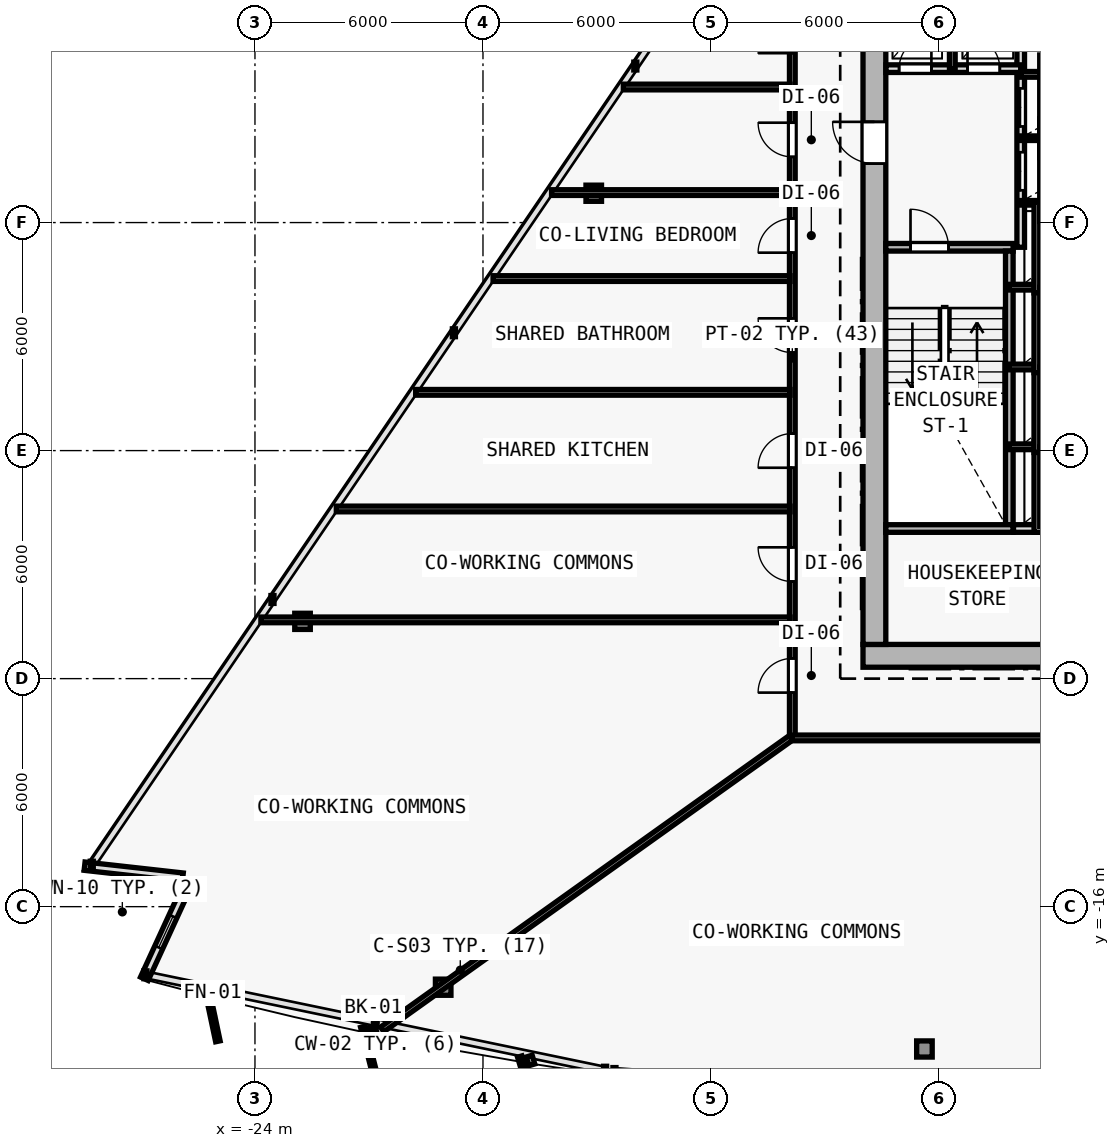
"""IFC4 building model, lengths in metres.
Left out: names, types, materials, properties, quantities, classifications, styles, units other than length and angle.
Written with IfcOpenShell. Run it as: python <this file> out.ifc"""

import sys

from ifc_helpers import new_model, si_unit, direction, frame, frame_2d, origin, origin_2d, place, context, subcontext, project, spatial, rectangle, i_section, extrude, element, fill, save


model = new_model("IFC4")
c1 = context("Model", 3, precision=1e-05, world=origin(), true_north=direction((0.0, 1.0)))
c2 = subcontext(c1, "Body", "Model", "MODEL_VIEW")
j1 = project(units=[si_unit("LENGTHUNIT", "METRE"), si_unit("PLANEANGLEUNIT", "RADIAN")], contexts=[c1])
p1 = place(None, origin())
s1 = spatial("IfcSite", under=j1, at=p1, CompositionType="ELEMENT")
p2 = place(p1, origin())
s2 = spatial("IfcBuilding", under=s1, at=p2, CompositionType="ELEMENT")
p3 = place(p2, frame((0.0, 0.0, 93.3)))
s3 = spatial("IfcBuildingStorey", under=s2, at=p3, CompositionType="ELEMENT", Elevation=93.3)
for number, where, z_axis, x_axis in (
    (1, (-7.7, -9.4, 0.0), (0.0, 0.0, 1.0), (1.0, 0.0, 0.0)),
    (2, (-7.7, 2.0, 0.0), (0.0, 0.0, 1.0), (1.0, 0.0, 0.0)),
):
    element("IfcColumn", number, at=place(p3, frame(where, z_axis=z_axis, x_axis=x_axis)), inside=s3, PredefinedType="COLUMN", context=c2, shape_type="SweptSolid", body=[
        extrude(i_section(OverallWidth=0.409, OverallDepth=0.425, WebThickness=0.021, FlangeThickness=0.034, FilletRadius=0.015, at=origin_2d()), origin(), (0.0, 0.0, 1.0), 3.6),
    ])
p4 = place(p3, frame((-19.047, -18.119, 0.005), z_axis=(0.020594847032, 0.03357707734, 0.999223914922), x_axis=(-0.852427604955, 0.522845271865, 0.0)))
e3 = element("IfcColumn", 3, at=p4, inside=s3, PredefinedType="COLUMN", context=c2, shape_type="SweptSolid", body=[
    extrude(i_section(OverallWidth=0.409, OverallDepth=0.425, WebThickness=0.021, FlangeThickness=0.034, FilletRadius=0.015, at=origin_2d()), origin(), (0.0, 0.0, 1.0), 3.592),
])
p5 = place(p3, frame((-6.384, -19.745, 0.005), z_axis=(0.00693381708, 0.03528089279, 0.999353381334), x_axis=(-0.981229659911, 0.192842823335, 0.0)))
e4 = element("IfcColumn", 4, at=p5, inside=s3, PredefinedType="COLUMN", context=c2, shape_type="SweptSolid", body=[
    extrude(i_section(OverallWidth=0.409, OverallDepth=0.425, WebThickness=0.021, FlangeThickness=0.034, FilletRadius=0.015, at=origin_2d()), origin(), (0.0, 0.0, 1.0), 3.592),
])
p6 = place(p3, frame((-15.085, 2.772, 0.005), z_axis=(0.01700241672, 0.009521353363, 0.999810112799), x_axis=(-0.488603368932, 0.87250601595, 0.0)))
e5 = element("IfcColumn", 5, at=p6, inside=s3, PredefinedType="COLUMN", context=c2, shape_type="SweptSolid", body=[
    extrude(i_section(OverallWidth=0.409, OverallDepth=0.425, WebThickness=0.021, FlangeThickness=0.034, FilletRadius=0.015, at=origin_2d()), origin(), (0.0, 0.0, 1.0), 3.59),
])
p7 = place(p3, frame((-22.749, -8.493, 0.005), z_axis=(0.025222449659, 0.021619242565, 0.999448065876), x_axis=(-0.650791373456, 0.759256602365, 0.0)))
e6 = element("IfcColumn", 6, at=p7, inside=s3, PredefinedType="COLUMN", context=c2, shape_type="SweptSolid", body=[
    extrude(i_section(OverallWidth=0.409, OverallDepth=0.425, WebThickness=0.021, FlangeThickness=0.034, FilletRadius=0.015, at=origin_2d()), origin(), (0.0, 0.0, 1.0), 3.591),
])
p8 = place(p3, frame((-25.898, -15.223, 0.0), z_axis=(0.0, 0.0, 1.0), x_axis=(-0.993827522589, 0.110936267041, 0.0)))
e7 = element("IfcWall", 7, at=p8, inside=s3, PredefinedType="SOLIDWALL", context=c2, shape_type="SweptSolid", body=[
    extrude(rectangle(XDim=2.601, YDim=0.22, at=frame_2d((1.301, 0.0))), origin(), (0.0, 0.0, 1.0), 3.35),
])
p9 = place(p3, frame((-26.911, -17.897, 0.0), z_axis=(0.0, 0.0, 1.0), x_axis=(0.417504190978, 0.908674997189, 0.0)))
e8 = element("IfcWall", 8, at=p9, inside=s3, PredefinedType="SOLIDWALL", context=c2, shape_type="SweptSolid", body=[
    extrude(rectangle(XDim=2.711, YDim=0.22, at=frame_2d((1.355, 0.0))), origin(), (0.0, 0.0, 1.0), 3.35),
])
p10 = place(p9, frame((0.906, 0.0, 0.62)))
e9 = element("IfcOpeningElement", 9, at=p10, cuts=e8, PredefinedType="OPENING", context=c2, shape_type="SweptSolid", body=[
    extrude(rectangle(XDim=0.9, YDim=1.6, at=frame_2d((0.45, 0.8))), frame((0.0, 0.12, 0.0), z_axis=(0.0, -1.0, 0.0), x_axis=(1.0, 0.0, 0.0)), (0.0, 0.0, 1.0), 0.24),
])
p11 = place(p3, frame((-8.0, -9.4, 0.0), z_axis=(0.0, 0.0, 1.0), x_axis=(1.0, 0.0, 0.0)))
e10 = element("IfcWall", 10, at=p11, inside=s3, PredefinedType="SHEAR", context=c2, shape_type="SweptSolid", body=[
    extrude(rectangle(XDim=16.0, YDim=0.6, at=frame_2d((8.0, 0.0))), origin(), (0.0, 0.0, 1.0), 3.35),
])
p12 = place(p11, frame((9.65, 0.0, 0.0)))
e11 = element("IfcOpeningElement", 11, at=p12, cuts=e10, PredefinedType="OPENING", context=c2, shape_type="SweptSolid", body=[
    extrude(rectangle(XDim=1.5, YDim=2.2, at=frame_2d((0.75, 1.1))), frame((0.0, 0.31, 0.0), z_axis=(0.0, -1.0, 0.0), x_axis=(1.0, 0.0, 0.0)), (0.0, 0.0, 1.0), 0.62),
])
p13 = place(p3, frame((-7.7, -9.1, 0.0), z_axis=(0.0, 0.0, 1.0), x_axis=(0.0, 1.0, 0.0)))
e12 = element("IfcWall", 12, at=p13, inside=s3, PredefinedType="SHEAR", context=c2, shape_type="SweptSolid", body=[
    extrude(rectangle(XDim=19.0, YDim=0.6, at=frame_2d((9.5, 0.0))), origin(), (0.0, 0.0, 1.0), 3.35),
])
p14 = place(p13, frame((12.65, 0.0, 0.0)))
e13 = element("IfcOpeningElement", 13, at=p14, cuts=e12, PredefinedType="OPENING", context=c2, shape_type="SweptSolid", body=[
    extrude(rectangle(XDim=1.1, YDim=2.15, at=frame_2d((0.55, 1.075))), frame((0.0, 0.31, 0.0), z_axis=(0.0, -1.0, 0.0), x_axis=(1.0, 0.0, 0.0)), (0.0, 0.0, 1.0), 0.62),
])
p15 = place(p3, frame((-7.4, 1.35, 0.0), z_axis=(0.0, 0.0, 1.0), x_axis=(1.0, 0.0, 0.0)))
e14 = element("IfcWall", 14, at=p15, inside=s3, PredefinedType="SOLIDWALL", context=c2, shape_type="SweptSolid", body=[
    extrude(rectangle(XDim=3.35, YDim=0.2, at=frame_2d((1.675, 0.0))), origin(), (0.0, 0.0, 1.0), 3.35),
])
p16 = place(p15, frame((0.65, 0.0, 0.0)))
e15 = element("IfcOpeningElement", 15, at=p16, cuts=e14, PredefinedType="OPENING", context=c2, shape_type="SweptSolid", body=[
    extrude(rectangle(XDim=1.0, YDim=2.15, at=frame_2d((0.5, 1.075))), frame((0.0, 0.11, 0.0), z_axis=(0.0, -1.0, 0.0), x_axis=(1.0, 0.0, 0.0)), (0.0, 0.0, 1.0), 0.22),
])
p17 = place(p3, frame((-4.15, -5.95, 0.0), z_axis=(0.0, 0.0, 1.0), x_axis=(0.0, 1.0, 0.0)))
e16 = element("IfcWall", 16, at=p17, inside=s3, PredefinedType="SOLIDWALL", context=c2, shape_type="SweptSolid", body=[
    extrude(rectangle(XDim=7.2, YDim=0.2, at=frame_2d((3.6, 0.0))), origin(), (0.0, 0.0, 1.0), 3.35),
])
p18 = place(p3, frame((-3.85, 1.35, 0.0), z_axis=(0.0, 0.0, 1.0), x_axis=(0.0, 1.0, 0.0)))
e17 = element("IfcWall", 17, at=p18, inside=s3, PredefinedType="SOLIDWALL", context=c2, shape_type="SweptSolid", body=[
    extrude(rectangle(XDim=8.545, YDim=0.2, at=frame_2d((4.272, 0.0))), origin(), (0.0, 0.0, 1.0), 3.35),
])
p19 = place(p18, frame((1.5, 0.0, 0.0)))
e18 = element("IfcOpeningElement", 18, at=p19, cuts=e17, PredefinedType="OPENING", context=c2, shape_type="SweptSolid", body=[
    extrude(rectangle(XDim=1.0, YDim=2.15, at=frame_2d((0.5, 1.075))), frame((0.0, 0.11, 0.0), z_axis=(0.0, -1.0, 0.0), x_axis=(1.0, 0.0, 0.0)), (0.0, 0.0, 1.0), 0.22),
])
p20 = place(p18, frame((3.18, 0.0, 0.0)))
e19 = element("IfcOpeningElement", 19, at=p20, cuts=e17, PredefinedType="OPENING", context=c2, shape_type="SweptSolid", body=[
    extrude(rectangle(XDim=1.0, YDim=2.15, at=frame_2d((0.5, 1.075))), frame((0.0, 0.11, 0.0), z_axis=(0.0, -1.0, 0.0), x_axis=(1.0, 0.0, 0.0)), (0.0, 0.0, 1.0), 0.22),
])
p21 = place(p3, frame((-7.395, 6.05, 0.0), z_axis=(0.0, 0.0, 1.0), x_axis=(1.0, 0.0, 0.0)))
e20 = element("IfcWall", 20, at=p21, inside=s3, PredefinedType="SOLIDWALL", context=c2, shape_type="SweptSolid", body=[
    extrude(rectangle(XDim=3.545, YDim=0.2, at=frame_2d((1.772, 0.0))), origin(), (0.0, 0.0, 1.0), 3.35),
])
p22 = place(p21, frame((0.345, 0.0, 0.0)))
e21 = element("IfcOpeningElement", 21, at=p22, cuts=e20, PredefinedType="OPENING", context=c2, shape_type="SweptSolid", body=[
    extrude(rectangle(XDim=0.85, YDim=2.1, at=frame_2d((0.425, 1.05))), frame((0.0, 0.11, 0.0), z_axis=(0.0, -1.0, 0.0), x_axis=(1.0, 0.0, 0.0)), (0.0, 0.0, 1.0), 0.22),
])
p23 = place(p21, frame((2.145, 0.0, 0.0)))
e22 = element("IfcOpeningElement", 22, at=p23, cuts=e20, PredefinedType="OPENING", context=c2, shape_type="SweptSolid", body=[
    extrude(rectangle(XDim=0.85, YDim=2.1, at=frame_2d((0.425, 1.05))), frame((0.0, 0.11, 0.0), z_axis=(0.0, -1.0, 0.0), x_axis=(1.0, 0.0, 0.0)), (0.0, 0.0, 1.0), 0.22),
])
p24 = place(p3, frame((-5.65, 6.05, 0.0), z_axis=(0.0, 0.0, 1.0), x_axis=(0.0, 1.0, 0.0)))
e23 = element("IfcWall", 23, at=p24, inside=s3, PredefinedType="PARTITIONING", context=c2, shape_type="SweptSolid", body=[
    extrude(rectangle(XDim=2.05, YDim=0.15, at=frame_2d((1.025, 0.0))), origin(), (0.0, 0.0, 1.0), 3.35),
])
for number, where, z_axis, x_axis in (
    (24, (-3.85, 2.52, 0.0), (0.0, 0.0, 1.0), (1.0, 0.0, 0.0)),
    (25, (-3.85, 4.22, 0.0), (0.0, 0.0, 1.0), (1.0, 0.0, 0.0)),
):
    element("IfcWall", number, at=place(p3, frame(where, z_axis=z_axis, x_axis=x_axis)), inside=s3, PredefinedType="PARTITIONING", context=c2, shape_type="SweptSolid", body=[
        extrude(rectangle(XDim=2.9, YDim=0.12, at=frame_2d((1.45, 0.0))), origin(), (0.0, 0.0, 1.0), 3.35),
    ])
p25 = place(p3, frame((-3.85, 5.9, 0.0), z_axis=(0.0, 0.0, 1.0), x_axis=(1.0, 0.0, 0.0)))
e26 = element("IfcWall", 26, at=p25, inside=s3, PredefinedType="PARTITIONING", context=c2, shape_type="SweptSolid", body=[
    extrude(rectangle(XDim=2.9, YDim=0.15, at=frame_2d((1.45, 0.0))), origin(), (0.0, 0.0, 1.0), 3.35),
])
for number, where, z_axis, x_axis in (
    (27, (-4.15, -3.9, 0.0), (0.0, 0.0, 1.0), (1.0, 0.0, 0.0)),
    (28, (-4.15, -1.8, 0.0), (0.0, 0.0, 1.0), (1.0, 0.0, 0.0)),
    (29, (-4.15, 0.3, 0.0), (0.0, 0.0, 1.0), (1.0, 0.0, 0.0)),
):
    element("IfcWall", number, at=place(p3, frame(where, z_axis=z_axis, x_axis=x_axis)), inside=s3, PredefinedType="PARTITIONING", context=c2, shape_type="SweptSolid", body=[
        extrude(rectangle(XDim=2.9, YDim=0.15, at=frame_2d((1.45, 0.0))), origin(), (0.0, 0.0, 1.0), 3.35),
    ])
p26 = place(p3, frame((-7.4, -6.05, 0.0), z_axis=(0.0, 0.0, 1.0), x_axis=(1.0, 0.0, 0.0)))
e30 = element("IfcWall", 30, at=p26, inside=s3, PredefinedType="SOLIDWALL", context=c2, shape_type="SweptSolid", body=[
    extrude(rectangle(XDim=3.35, YDim=0.2, at=frame_2d((1.675, 0.0))), origin(), (0.0, 0.0, 1.0), 3.35),
])
p27 = place(p3, frame((-4.04, -6.05, 0.0), z_axis=(0.0, 0.0, 1.0), x_axis=(1.0, 0.0, 0.0)))
e31 = element("IfcWall", 31, at=p27, inside=s3, PredefinedType="SOLIDWALL", context=c2, shape_type="SweptSolid", body=[
    extrude(rectangle(XDim=2.79, YDim=0.2, at=frame_2d((1.395, 0.0))), origin(), (0.0, 0.0, 1.0), 3.35),
])
p28 = place(p3, frame((-9.86, -11.56, 0.0), z_axis=(0.0, 0.0, 1.0), x_axis=(0.0, 1.0, 0.0)))
e32 = element("IfcWall", 32, at=p28, inside=s3, PredefinedType="PARTITIONING", context=c2, shape_type="SweptSolid", body=[
    extrude(rectangle(XDim=19.986, YDim=0.15, at=frame_2d((9.993, 0.0))), origin(), (0.0, 0.0, 1.0), 2.705),
])
p29 = place(p28, frame((10.14, 0.0, 0.0)))
e33 = element("IfcOpeningElement", 33, at=p29, cuts=e32, PredefinedType="OPENING", context=c2, shape_type="SweptSolid", body=[
    extrude(rectangle(XDim=0.9, YDim=2.1, at=frame_2d((0.45, 1.05))), frame((0.0, 0.085, 0.0), z_axis=(0.0, -1.0, 0.0), x_axis=(1.0, 0.0, 0.0)), (0.0, 0.0, 1.0), 0.17),
])
p30 = place(p28, frame((7.109, 0.0, 0.0)))
e34 = element("IfcOpeningElement", 34, at=p30, cuts=e32, PredefinedType="OPENING", context=c2, shape_type="SweptSolid", body=[
    extrude(rectangle(XDim=0.9, YDim=2.1, at=frame_2d((0.45, 1.05))), frame((0.0, 0.085, 0.0), z_axis=(0.0, -1.0, 0.0), x_axis=(1.0, 0.0, 0.0)), (0.0, 0.0, 1.0), 0.17),
])
p31 = place(p28, frame((4.115, 0.0, 0.0)))
e35 = element("IfcOpeningElement", 35, at=p31, cuts=e32, PredefinedType="OPENING", context=c2, shape_type="SweptSolid", body=[
    extrude(rectangle(XDim=0.9, YDim=2.1, at=frame_2d((0.45, 1.05))), frame((0.0, 0.085, 0.0), z_axis=(0.0, -1.0, 0.0), x_axis=(1.0, 0.0, 0.0)), (0.0, 0.0, 1.0), 0.17),
])
p32 = place(p28, frame((1.192, 0.0, 0.0)))
e36 = element("IfcOpeningElement", 36, at=p32, cuts=e32, PredefinedType="OPENING", context=c2, shape_type="SweptSolid", body=[
    extrude(rectangle(XDim=0.9, YDim=2.1, at=frame_2d((0.45, 1.05))), frame((0.0, 0.085, 0.0), z_axis=(0.0, -1.0, 0.0), x_axis=(1.0, 0.0, 0.0)), (0.0, 0.0, 1.0), 0.17),
])
p33 = place(p28, frame((18.017, 0.0, 0.0)))
e37 = element("IfcOpeningElement", 37, at=p33, cuts=e32, PredefinedType="OPENING", context=c2, shape_type="SweptSolid", body=[
    extrude(rectangle(XDim=0.9, YDim=2.1, at=frame_2d((0.45, 1.05))), frame((0.0, 0.085, 0.0), z_axis=(0.0, -1.0, 0.0), x_axis=(1.0, 0.0, 0.0)), (0.0, 0.0, 1.0), 0.17),
])
p34 = place(p28, frame((15.288, 0.0, 0.0)))
e38 = element("IfcOpeningElement", 38, at=p34, cuts=e32, PredefinedType="OPENING", context=c2, shape_type="SweptSolid", body=[
    extrude(rectangle(XDim=0.9, YDim=2.1, at=frame_2d((0.45, 1.05))), frame((0.0, 0.085, 0.0), z_axis=(0.0, -1.0, 0.0), x_axis=(1.0, 0.0, 0.0)), (0.0, 0.0, 1.0), 0.17),
])
p35 = place(p28, frame((12.768, 0.0, 0.0)))
e39 = element("IfcOpeningElement", 39, at=p35, cuts=e32, PredefinedType="OPENING", context=c2, shape_type="SweptSolid", body=[
    extrude(rectangle(XDim=0.9, YDim=2.1, at=frame_2d((0.45, 1.05))), frame((0.0, 0.085, 0.0), z_axis=(0.0, -1.0, 0.0), x_axis=(1.0, 0.0, 0.0)), (0.0, 0.0, 1.0), 0.17),
])
p36 = place(p3, frame((-3.08, -11.56, 0.0), z_axis=(0.0, 0.0, 1.0), x_axis=(-1.0, 0.0, 0.0)))
e40 = element("IfcWall", 40, at=p36, inside=s3, PredefinedType="PARTITIONING", context=c2, shape_type="SweptSolid", body=[
    extrude(rectangle(XDim=6.78, YDim=0.15, at=frame_2d((3.39, 0.0))), origin(), (0.0, 0.0, 1.0), 3.35),
])
p37 = place(p3, frame((-9.896, -11.558, 0.0), z_axis=(0.0, 0.0, 1.0), x_axis=(-0.81409664299, -0.580729417089, 0.0)))
e41 = element("IfcWall", 41, at=p37, inside=s3, PredefinedType="PARTITIONING", context=c2, shape_type="SweptSolid", body=[
    extrude(rectangle(XDim=13.212, YDim=0.15, at=frame_2d((6.606, 0.0))), origin(), (0.0, 0.0, 1.0), 2.775),
])
p38 = place(p3, frame((-9.92, 2.789, 0.0), z_axis=(0.0, 0.0, 1.0), x_axis=(-1.0, 0.0, 0.0)))
e42 = element("IfcWall", 42, at=p38, inside=s3, PredefinedType="PARTITIONING", context=c2, shape_type="SweptSolid", body=[
    extrude(rectangle(XDim=6.276, YDim=0.15, at=frame_2d((3.138, 0.0))), origin(), (0.0, 0.0, 1.0), 2.835),
])
p39 = place(p3, frame((-9.92, -8.454, 0.0), z_axis=(0.0, 0.0, 1.0), x_axis=(-1.0, 0.0, 0.0)))
e43 = element("IfcWall", 43, at=p39, inside=s3, PredefinedType="PARTITIONING", context=c2, shape_type="SweptSolid", body=[
    extrude(rectangle(XDim=13.924, YDim=0.15, at=frame_2d((6.962, 0.0))), origin(), (0.0, 0.0, 1.0), 2.705),
])
p40 = place(p3, frame((-9.92, -2.467, 0.0), z_axis=(0.0, 0.0, 1.0), x_axis=(-1.0, 0.0, 0.0)))
e44 = element("IfcWall", 44, at=p40, inside=s3, PredefinedType="PARTITIONING", context=c2, shape_type="SweptSolid", body=[
    extrude(rectangle(XDim=9.851, YDim=0.15, at=frame_2d((4.926, 0.0))), origin(), (0.0, 0.0, 1.0), 2.835),
])
p41 = place(p3, frame((-9.92, 0.527, 0.0), z_axis=(0.0, 0.0, 1.0), x_axis=(-1.0, 0.0, 0.0)))
e45 = element("IfcWall", 45, at=p41, inside=s3, PredefinedType="PARTITIONING", context=c2, shape_type="SweptSolid", body=[
    extrude(rectangle(XDim=7.815, YDim=0.15, at=frame_2d((3.907, 0.0))), origin(), (0.0, 0.0, 1.0), 2.835),
])
p42 = place(p3, frame((-9.92, -5.536, 0.0), z_axis=(0.0, 0.0, 1.0), x_axis=(-1.0, 0.0, 0.0)))
e46 = element("IfcWall", 46, at=p42, inside=s3, PredefinedType="PARTITIONING", context=c2, shape_type="SweptSolid", body=[
    extrude(rectangle(XDim=11.939, YDim=0.15, at=frame_2d((5.969, 0.0))), origin(), (0.0, 0.0, 1.0), 2.835),
])
p43 = place(p3, frame((-9.92, 5.567, 0.0), z_axis=(0.0, 0.0, 1.0), x_axis=(-1.0, 0.0, 0.0)))
e47 = element("IfcWall", 47, at=p43, inside=s3, PredefinedType="PARTITIONING", context=c2, shape_type="SweptSolid", body=[
    extrude(rectangle(XDim=4.386, YDim=0.15, at=frame_2d((2.193, 0.0))), origin(), (0.0, 0.0, 1.0), 2.835),
])
p44 = place(p10, origin())
e48 = element("IfcWindow", 48, at=p44, inside=s3, PartitioningType="SINGLE_PANEL", PredefinedType="WINDOW", context=c2, shape_type="SweptSolid", body=[
    extrude(rectangle(XDim=0.9, YDim=1.6, at=frame_2d((0.45, 0.8))), frame((0.0, 0.03, 0.0), z_axis=(0.0, -1.0, 0.0), x_axis=(1.0, 0.0, 0.0)), (0.0, 0.0, 1.0), 0.06),
])
fill(e9, e48)
p45 = place(p14, origin())
e49 = element("IfcDoor", 49, at=p45, inside=s3, OperationType="SINGLE_SWING_RIGHT", PredefinedType="DOOR", context=c2, shape_type="SweptSolid", body=[
    extrude(rectangle(XDim=1.1, YDim=2.15, at=frame_2d((0.55, 1.075))), frame((0.0, 0.025, 0.0), z_axis=(0.0, -1.0, 0.0), x_axis=(1.0, 0.0, 0.0)), (0.0, 0.0, 1.0), 0.05),
])
fill(e13, e49)
p46 = place(p16, origin())
e50 = element("IfcDoor", 50, at=p46, inside=s3, OperationType="SINGLE_SWING_LEFT", PredefinedType="DOOR", context=c2, shape_type="SweptSolid", body=[
    extrude(rectangle(XDim=1.0, YDim=2.15, at=frame_2d((0.5, 1.075))), frame((0.0, 0.025, 0.0), z_axis=(0.0, -1.0, 0.0), x_axis=(1.0, 0.0, 0.0)), (0.0, 0.0, 1.0), 0.05),
])
fill(e15, e50)
p47 = place(p22, origin())
e51 = element("IfcDoor", 51, at=p47, inside=s3, OperationType="SINGLE_SWING_RIGHT", PredefinedType="DOOR", context=c2, shape_type="SweptSolid", body=[
    extrude(rectangle(XDim=0.85, YDim=2.1, at=frame_2d((0.425, 1.05))), frame((0.0, 0.025, 0.0), z_axis=(0.0, -1.0, 0.0), x_axis=(1.0, 0.0, 0.0)), (0.0, 0.0, 1.0), 0.05),
])
fill(e21, e51)
p48 = place(p23, origin())
e52 = element("IfcDoor", 52, at=p48, inside=s3, OperationType="SINGLE_SWING_LEFT", PredefinedType="DOOR", context=c2, shape_type="SweptSolid", body=[
    extrude(rectangle(XDim=0.85, YDim=2.1, at=frame_2d((0.425, 1.05))), frame((0.0, 0.025, 0.0), z_axis=(0.0, -1.0, 0.0), x_axis=(1.0, 0.0, 0.0)), (0.0, 0.0, 1.0), 0.05),
])
fill(e22, e52)
p49 = place(p19, origin())
e53 = element("IfcDoor", 53, at=p49, inside=s3, OperationType="DOUBLE_DOOR_SLIDING", PredefinedType="DOOR", context=c2, shape_type="SweptSolid", body=[
    extrude(rectangle(XDim=1.0, YDim=2.15, at=frame_2d((0.5, 1.075))), frame((0.0, 0.025, 0.0), z_axis=(0.0, -1.0, 0.0), x_axis=(1.0, 0.0, 0.0)), (0.0, 0.0, 1.0), 0.05),
])
fill(e18, e53)
p50 = place(p20, origin())
e54 = element("IfcDoor", 54, at=p50, inside=s3, OperationType="DOUBLE_DOOR_SLIDING", PredefinedType="DOOR", context=c2, shape_type="SweptSolid", body=[
    extrude(rectangle(XDim=1.0, YDim=2.15, at=frame_2d((0.5, 1.075))), frame((0.0, 0.025, 0.0), z_axis=(0.0, -1.0, 0.0), x_axis=(1.0, 0.0, 0.0)), (0.0, 0.0, 1.0), 0.05),
])
fill(e19, e54)
p51 = place(p29, origin())
e55 = element("IfcDoor", 55, at=p51, inside=s3, OperationType="SINGLE_SWING_RIGHT", PredefinedType="DOOR", context=c2, shape_type="SweptSolid", body=[
    extrude(rectangle(XDim=0.9, YDim=2.1, at=frame_2d((0.45, 1.05))), frame((0.0, 0.025, 0.0), z_axis=(0.0, -1.0, 0.0), x_axis=(1.0, 0.0, 0.0)), (0.0, 0.0, 1.0), 0.05),
])
fill(e33, e55)
p52 = place(p30, origin())
e56 = element("IfcDoor", 56, at=p52, inside=s3, OperationType="SINGLE_SWING_LEFT", PredefinedType="DOOR", context=c2, shape_type="SweptSolid", body=[
    extrude(rectangle(XDim=0.9, YDim=2.1, at=frame_2d((0.45, 1.05))), frame((0.0, 0.025, 0.0), z_axis=(0.0, -1.0, 0.0), x_axis=(1.0, 0.0, 0.0)), (0.0, 0.0, 1.0), 0.05),
])
fill(e34, e56)
p53 = place(p31, origin())
e57 = element("IfcDoor", 57, at=p53, inside=s3, OperationType="SINGLE_SWING_RIGHT", PredefinedType="DOOR", context=c2, shape_type="SweptSolid", body=[
    extrude(rectangle(XDim=0.9, YDim=2.1, at=frame_2d((0.45, 1.05))), frame((0.0, 0.025, 0.0), z_axis=(0.0, -1.0, 0.0), x_axis=(1.0, 0.0, 0.0)), (0.0, 0.0, 1.0), 0.05),
])
fill(e35, e57)
p54 = place(p32, origin())
e58 = element("IfcDoor", 58, at=p54, inside=s3, OperationType="SINGLE_SWING_LEFT", PredefinedType="DOOR", context=c2, shape_type="SweptSolid", body=[
    extrude(rectangle(XDim=0.9, YDim=2.1, at=frame_2d((0.45, 1.05))), frame((0.0, 0.025, 0.0), z_axis=(0.0, -1.0, 0.0), x_axis=(1.0, 0.0, 0.0)), (0.0, 0.0, 1.0), 0.05),
])
fill(e36, e58)
p55 = place(p33, origin())
e59 = element("IfcDoor", 59, at=p55, inside=s3, OperationType="SINGLE_SWING_LEFT", PredefinedType="DOOR", context=c2, shape_type="SweptSolid", body=[
    extrude(rectangle(XDim=0.9, YDim=2.1, at=frame_2d((0.45, 1.05))), frame((0.0, 0.025, 0.0), z_axis=(0.0, -1.0, 0.0), x_axis=(1.0, 0.0, 0.0)), (0.0, 0.0, 1.0), 0.05),
])
fill(e37, e59)
p56 = place(p34, origin())
e60 = element("IfcDoor", 60, at=p56, inside=s3, OperationType="SINGLE_SWING_RIGHT", PredefinedType="DOOR", context=c2, shape_type="SweptSolid", body=[
    extrude(rectangle(XDim=0.9, YDim=2.1, at=frame_2d((0.45, 1.05))), frame((0.0, 0.025, 0.0), z_axis=(0.0, -1.0, 0.0), x_axis=(1.0, 0.0, 0.0)), (0.0, 0.0, 1.0), 0.05),
])
fill(e38, e60)
p57 = place(p35, origin())
e61 = element("IfcDoor", 61, at=p57, inside=s3, OperationType="SINGLE_SWING_LEFT", PredefinedType="DOOR", context=c2, shape_type="SweptSolid", body=[
    extrude(rectangle(XDim=0.9, YDim=2.1, at=frame_2d((0.45, 1.05))), frame((0.0, 0.025, 0.0), z_axis=(0.0, -1.0, 0.0), x_axis=(1.0, 0.0, 0.0)), (0.0, 0.0, 1.0), 0.05),
])
fill(e39, e61)
save(model, sys.argv[1])
